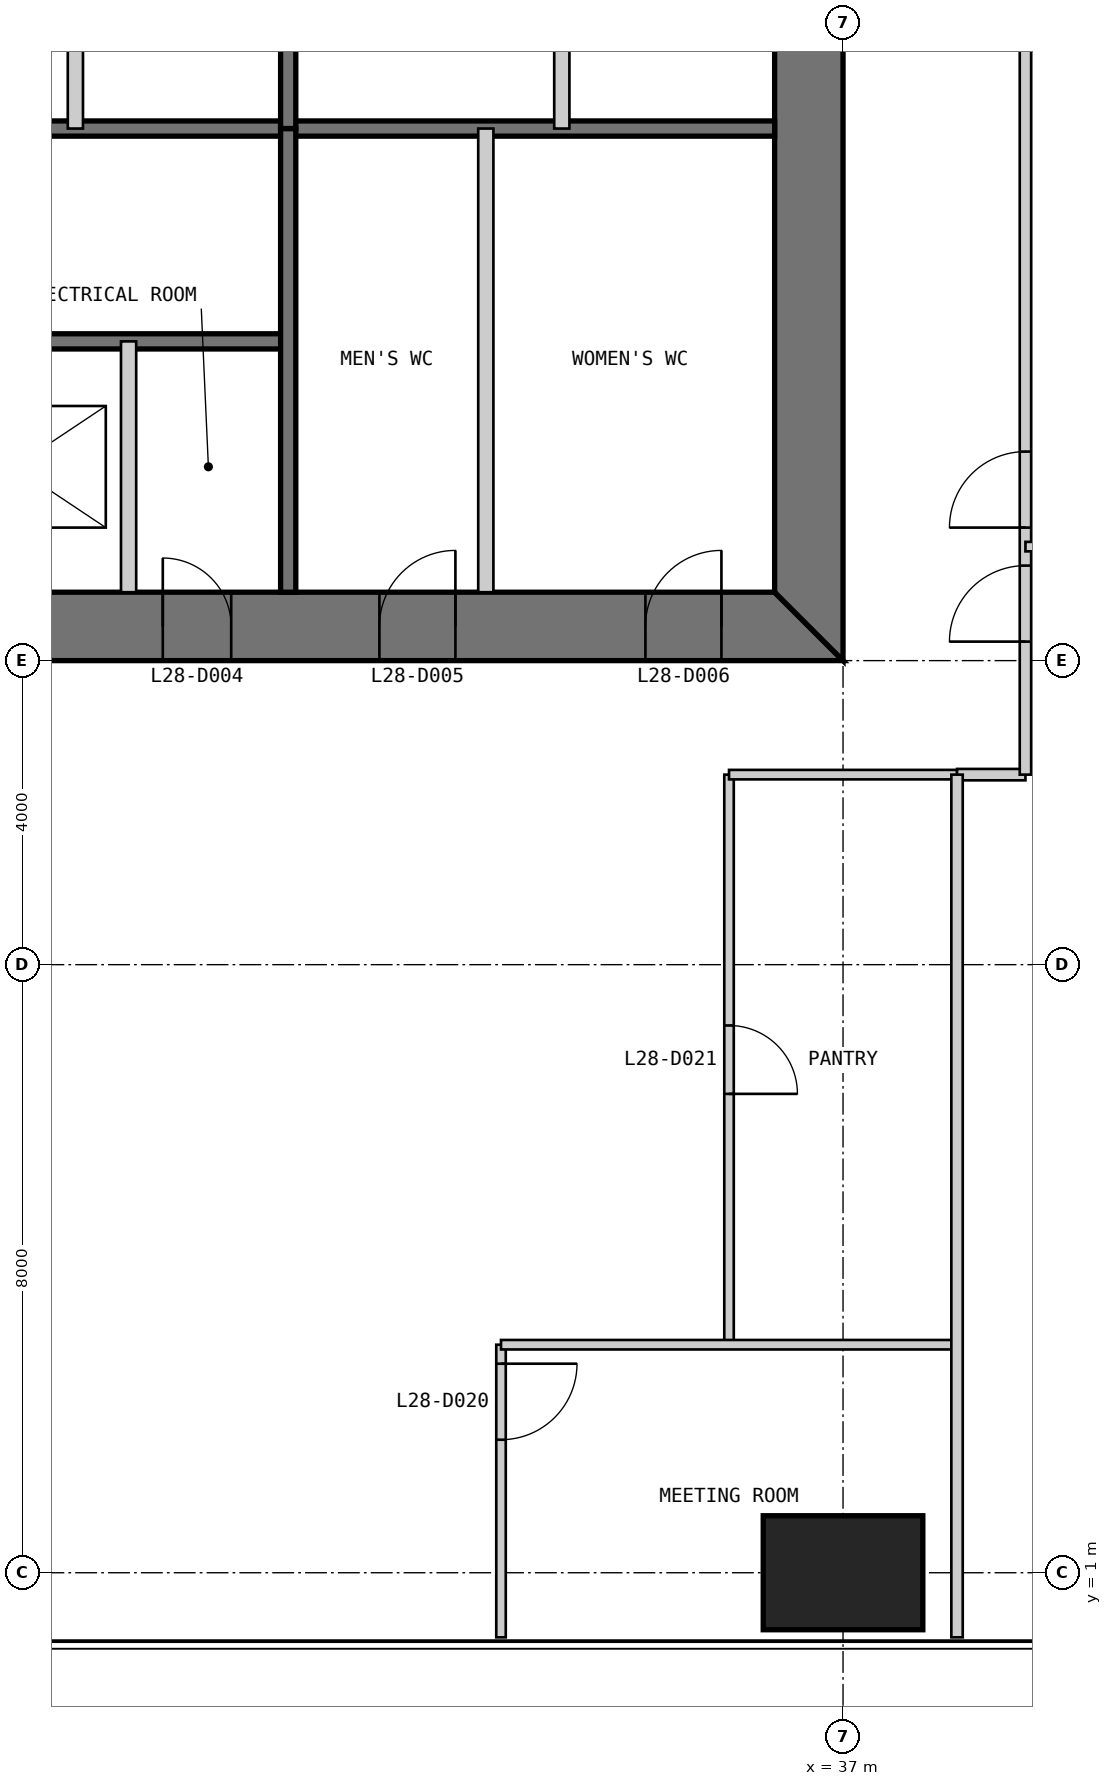
"""IFC4 building model, lengths in metres.
Left out: names, types, materials, properties, quantities, classifications, styles, units other than length and angle.
Written with IfcOpenShell. Run it as: python <this file> out.ifc"""

import sys

from ifc_helpers import new_model, si_unit, direction, frame, frame_2d, origin, origin_2d, place, context, subcontext, project, spatial, polyline, rectangle, outline, extrude, element, fill, save


model = new_model("IFC4")
c1 = context("Model", 3, precision=1e-05, world=origin(), true_north=direction((0.0, 1.0)))
c2 = subcontext(c1, "Body", "Model", "MODEL_VIEW")
j1 = project(units=[si_unit("LENGTHUNIT", "METRE"), si_unit("PLANEANGLEUNIT", "RADIAN")], contexts=[c1])
p1 = place(None, origin())
s1 = spatial("IfcSite", under=j1, at=p1, CompositionType="ELEMENT")
p2 = place(p1, origin())
s2 = spatial("IfcBuilding", under=s1, at=p2, CompositionType="ELEMENT")
p3 = place(p2, frame((0.0, 0.0, 122.4)))
s3 = spatial("IfcBuildingStorey", under=s2, at=p3, CompositionType="ELEMENT", Elevation=122.4)
p4 = place(p3, frame((37.0, 1.0, 0.0), z_axis=(0.0, 0.0, 1.0), x_axis=(1.0, 0.0, 0.0)))
e1 = element("IfcColumn", 1, at=p4, inside=s3, PredefinedType="COLUMN", context=c2, shape_type="SweptSolid", body=[
    extrude(rectangle(XDim=2.1, YDim=1.5, at=origin_2d()), origin(), (0.0, 0.0, 1.0), 4.0),
])
p5 = place(p3, frame((13.0, 13.45, 0.0), z_axis=(0.0, 0.0, 1.0), x_axis=(1.0, 0.0, 0.0)))
e2 = element("IfcWall", 2, at=p5, inside=s3, PredefinedType="SHEAR", context=c2, shape_type="SweptSolid", body=[
    extrude(outline(polyline([(0.0, -0.45), (24.0, -0.45), (23.1, 0.45), (0.9, 0.45), (0.0, -0.45)])), origin(), (0.0, 0.0, 1.0), 4.0),
])
p6 = place(p5, frame((4.9, 0.0, 0.0)))
e3 = element("IfcOpeningElement", 3, at=p6, cuts=e2, PredefinedType="OPENING", context=c2, shape_type="SweptSolid", body=[
    extrude(rectangle(XDim=1.0, YDim=2.2, at=frame_2d((0.5, 1.1))), frame((0.0, 0.46, 0.0), z_axis=(0.0, -1.0, 0.0), x_axis=(1.0, 0.0, 0.0)), (0.0, 0.0, 1.0), 0.92),
])
p7 = place(p5, frame((8.9, 0.0, 0.0)))
e4 = element("IfcOpeningElement", 4, at=p7, cuts=e2, PredefinedType="OPENING", context=c2, shape_type="SweptSolid", body=[
    extrude(rectangle(XDim=1.1, YDim=2.2, at=frame_2d((0.55, 1.1))), frame((0.0, 0.46, 0.0), z_axis=(0.0, -1.0, 0.0), x_axis=(1.0, 0.0, 0.0)), (0.0, 0.0, 1.0), 0.92),
])
p8 = place(p5, frame((15.05, 0.0, 0.0)))
e5 = element("IfcOpeningElement", 5, at=p8, cuts=e2, PredefinedType="OPENING", context=c2, shape_type="SweptSolid", body=[
    extrude(rectangle(XDim=0.9, YDim=2.2, at=frame_2d((0.45, 1.1))), frame((0.0, 0.46, 0.0), z_axis=(0.0, -1.0, 0.0), x_axis=(1.0, 0.0, 0.0)), (0.0, 0.0, 1.0), 0.92),
])
p9 = place(p5, frame((17.9, 0.0, 0.0)))
e6 = element("IfcOpeningElement", 6, at=p9, cuts=e2, PredefinedType="OPENING", context=c2, shape_type="SweptSolid", body=[
    extrude(rectangle(XDim=1.0, YDim=2.2, at=frame_2d((0.5, 1.1))), frame((0.0, 0.46, 0.0), z_axis=(0.0, -1.0, 0.0), x_axis=(1.0, 0.0, 0.0)), (0.0, 0.0, 1.0), 0.92),
])
p10 = place(p5, frame((21.4, 0.0, 0.0)))
e7 = element("IfcOpeningElement", 7, at=p10, cuts=e2, PredefinedType="OPENING", context=c2, shape_type="SweptSolid", body=[
    extrude(rectangle(XDim=1.0, YDim=2.2, at=frame_2d((0.5, 1.1))), frame((0.0, 0.46, 0.0), z_axis=(0.0, -1.0, 0.0), x_axis=(1.0, 0.0, 0.0)), (0.0, 0.0, 1.0), 0.92),
])
p11 = place(p3, frame((36.55, 13.9, 0.0), z_axis=(0.0, 0.0, 1.0), x_axis=(0.0, 1.0, 0.0)))
e8 = element("IfcWall", 8, at=p11, inside=s3, PredefinedType="SHEAR", context=c2, shape_type="SweptSolid", body=[
    extrude(outline(polyline([(-0.9, -0.45), (23.1, -0.45), (22.2, 0.45), (0.0, 0.45), (-0.9, -0.45)])), origin(), (0.0, 0.0, 1.0), 4.0),
])
p12 = place(p11, frame((20.2, 0.0, 0.0)))
e9 = element("IfcOpeningElement", 9, at=p12, cuts=e8, PredefinedType="OPENING", context=c2, shape_type="SweptSolid", body=[
    extrude(rectangle(XDim=1.0, YDim=2.2, at=frame_2d((0.5, 1.1))), frame((0.0, 0.46, 0.0), z_axis=(0.0, -1.0, 0.0), x_axis=(1.0, 0.0, 0.0)), (0.0, 0.0, 1.0), 0.92),
])
p13 = place(p11, frame((17.25, 0.0, 0.0)))
e10 = element("IfcOpeningElement", 10, at=p13, cuts=e8, PredefinedType="OPENING", context=c2, shape_type="SweptSolid", body=[
    extrude(rectangle(XDim=0.9, YDim=2.2, at=frame_2d((0.45, 1.1))), frame((0.0, 0.46, 0.0), z_axis=(0.0, -1.0, 0.0), x_axis=(1.0, 0.0, 0.0)), (0.0, 0.0, 1.0), 0.92),
])
p14 = place(p3, frame((20.3, 17.2, 0.0), z_axis=(0.0, 0.0, 1.0), x_axis=(1.0, 0.0, 0.0)))
e11 = element("IfcWall", 11, at=p14, inside=s3, PredefinedType="SOLIDWALL", context=c2, shape_type="SweptSolid", body=[
    extrude(rectangle(XDim=9.4, YDim=0.2, at=frame_2d((4.7, 0.0))), origin(), (0.0, 0.0, 1.0), 3.8),
])
p15 = place(p14, frame((0.25, 0.0, 0.0)))
e12 = element("IfcOpeningElement", 12, at=p15, cuts=e11, PredefinedType="OPENING", context=c2, shape_type="SweptSolid", body=[
    extrude(rectangle(XDim=1.0, YDim=2.2, at=frame_2d((0.5, 1.1))), frame((0.0, 0.11, 0.0), z_axis=(0.0, -1.0, 0.0), x_axis=(1.0, 0.0, 0.0)), (0.0, 0.0, 1.0), 0.22),
])
p16 = place(p3, frame((20.3, 20.0, 0.0), z_axis=(0.0, 0.0, 1.0), x_axis=(1.0, 0.0, 0.0)))
e13 = element("IfcWall", 13, at=p16, inside=s3, PredefinedType="SOLIDWALL", context=c2, shape_type="SweptSolid", body=[
    extrude(rectangle(XDim=15.8, YDim=0.2, at=frame_2d((7.9, 0.0))), origin(), (0.0, 0.0, 1.0), 3.8),
])
p17 = place(p3, frame((27.6, 13.9, 0.0), z_axis=(0.0, 0.0, 1.0), x_axis=(0.0, 1.0, 0.0)))
e14 = element("IfcWall", 14, at=p17, inside=s3, PredefinedType="PARTITIONING", context=c2, shape_type="SweptSolid", body=[
    extrude(rectangle(XDim=3.3, YDim=0.2, at=frame_2d((1.65, 0.0))), origin(), (0.0, 0.0, 1.0), 3.8),
])
p18 = place(p3, frame((29.7, 13.9, 0.0), z_axis=(0.0, 0.0, 1.0), x_axis=(0.0, 1.0, 0.0)))
e15 = element("IfcWall", 15, at=p18, inside=s3, PredefinedType="SOLIDWALL", context=c2, shape_type="SweptSolid", body=[
    extrude(rectangle(XDim=6.1, YDim=0.2, at=frame_2d((3.05, 0.0))), origin(), (0.0, 0.0, 1.0), 3.8),
])
p19 = place(p3, frame((32.3, 13.9, 0.0), z_axis=(0.0, 0.0, 1.0), x_axis=(0.0, 1.0, 0.0)))
e16 = element("IfcWall", 16, at=p19, inside=s3, PredefinedType="PARTITIONING", context=c2, shape_type="SweptSolid", body=[
    extrude(rectangle(XDim=6.1, YDim=0.2, at=frame_2d((3.05, 0.0))), origin(), (0.0, 0.0, 1.0), 3.8),
])
p20 = place(p3, frame((33.3, 36.1, 0.0), z_axis=(0.0, 0.0, 1.0), x_axis=(0.0, -1.0, 0.0)))
e17 = element("IfcWall", 17, at=p20, inside=s3, PredefinedType="PARTITIONING", context=c2, shape_type="SweptSolid", body=[
    extrude(rectangle(XDim=16.1, YDim=0.2, at=frame_2d((8.05, 0.0))), origin(), (0.0, 0.0, 1.0), 3.8),
])
p21 = place(p3, frame((29.7, 36.1, 0.0), z_axis=(0.0, 0.0, 1.0), x_axis=(0.0, -1.0, 0.0)))
e18 = element("IfcWall", 18, at=p21, inside=s3, PredefinedType="SOLIDWALL", context=c2, shape_type="SweptSolid", body=[
    extrude(rectangle(XDim=16.1, YDim=0.2, at=frame_2d((8.05, 0.0))), origin(), (0.0, 0.0, 1.0), 3.8),
])
p22 = place(p3, frame((26.9, 30.0, 0.0), z_axis=(0.0, 0.0, 1.0), x_axis=(0.0, -1.0, 0.0)))
e19 = element("IfcWall", 19, at=p22, inside=s3, PredefinedType="PARTITIONING", context=c2, shape_type="SweptSolid", body=[
    extrude(rectangle(XDim=10.0, YDim=0.2, at=frame_2d((5.0, 0.0))), origin(), (0.0, 0.0, 1.0), 3.8),
])
p23 = place(p3, frame((32.5, 0.15, 0.0), z_axis=(0.0, 0.0, 1.0), x_axis=(0.0, 1.0, 0.0)))
e20 = element("IfcWall", 20, at=p23, inside=s3, PredefinedType="PARTITIONING", context=c2, shape_type="SweptSolid", body=[
    extrude(rectangle(XDim=3.85, YDim=0.125, at=frame_2d((1.925, 0.0))), origin(), (0.0, 0.0, 1.0), 3.85),
])
p24 = place(p23, frame((2.6, 0.0, 0.0)))
e21 = element("IfcOpeningElement", 21, at=p24, cuts=e20, PredefinedType="OPENING", context=c2, shape_type="SweptSolid", body=[
    extrude(rectangle(XDim=1.0, YDim=2.2, at=frame_2d((0.5, 1.1))), frame((0.0, 0.073, 0.0), z_axis=(0.0, -1.0, 0.0), x_axis=(1.0, 0.0, 0.0)), (0.0, 0.0, 1.0), 0.145),
])
p25 = place(p3, frame((35.5, 4.0, 0.0), z_axis=(0.0, 0.0, 1.0), x_axis=(0.0, 1.0, 0.0)))
e22 = element("IfcWall", 22, at=p25, inside=s3, PredefinedType="PARTITIONING", context=c2, shape_type="SweptSolid", body=[
    extrude(rectangle(XDim=7.5, YDim=0.125, at=frame_2d((3.75, 0.0))), origin(), (0.0, 0.0, 1.0), 3.85),
])
p26 = place(p25, frame((3.3, 0.0, 0.0)))
e23 = element("IfcOpeningElement", 23, at=p26, cuts=e22, PredefinedType="OPENING", context=c2, shape_type="SweptSolid", body=[
    extrude(rectangle(XDim=0.9, YDim=2.2, at=frame_2d((0.45, 1.1))), frame((0.0, 0.073, 0.0), z_axis=(0.0, -1.0, 0.0), x_axis=(1.0, 0.0, 0.0)), (0.0, 0.0, 1.0), 0.145),
])
p27 = place(p3, frame((32.5, 4.0, 0.0), z_axis=(0.0, 0.0, 1.0), x_axis=(1.0, 0.0, 0.0)))
e24 = element("IfcWall", 24, at=p27, inside=s3, PredefinedType="PARTITIONING", context=c2, shape_type="SweptSolid", body=[
    extrude(rectangle(XDim=6.0, YDim=0.125, at=frame_2d((3.0, 0.0))), origin(), (0.0, 0.0, 1.0), 3.85),
])
p28 = place(p3, frame((35.5, 11.5, 0.0), z_axis=(0.0, 0.0, 1.0), x_axis=(1.0, 0.0, 0.0)))
e25 = element("IfcWall", 25, at=p28, inside=s3, PredefinedType="PARTITIONING", context=c2, shape_type="SweptSolid", body=[
    extrude(rectangle(XDim=3.0, YDim=0.125, at=frame_2d((1.5, 0.0))), origin(), (0.0, 0.0, 1.0), 3.85),
])
p29 = place(p3, frame((38.5, 11.5, 0.0), z_axis=(0.0, 0.0, 1.0), x_axis=(1.0, 0.0, 0.0)))
e26 = element("IfcWall", 26, at=p29, inside=s3, PredefinedType="PARTITIONING", context=c2, shape_type="SweptSolid", body=[
    extrude(rectangle(XDim=0.9, YDim=0.15, at=frame_2d((0.45, 0.0))), origin(), (0.0, 0.0, 1.0), 3.85),
])
p30 = place(p3, frame((39.4, 11.5, 0.0), z_axis=(0.0, 0.0, 1.0), x_axis=(0.0, 1.0, 0.0)))
e27 = element("IfcWall", 27, at=p30, inside=s3, PredefinedType="PARTITIONING", context=c2, shape_type="SweptSolid", body=[
    extrude(rectangle(XDim=27.0, YDim=0.15, at=frame_2d((13.5, 0.0))), origin(), (0.0, 0.0, 1.0), 3.85),
])
p31 = place(p30, frame((3.25, 0.0, 0.0)))
e28 = element("IfcOpeningElement", 28, at=p31, cuts=e27, PredefinedType="OPENING", context=c2, shape_type="SweptSolid", body=[
    extrude(rectangle(XDim=1.0, YDim=2.2, at=frame_2d((0.5, 1.1))), frame((0.0, 0.085, 0.0), z_axis=(0.0, -1.0, 0.0), x_axis=(1.0, 0.0, 0.0)), (0.0, 0.0, 1.0), 0.17),
])
p32 = place(p30, frame((25.75, 0.0, 0.0)))
e29 = element("IfcOpeningElement", 29, at=p32, cuts=e27, PredefinedType="OPENING", context=c2, shape_type="SweptSolid", body=[
    extrude(rectangle(XDim=1.0, YDim=2.2, at=frame_2d((0.5, 1.1))), frame((0.0, 0.085, 0.0), z_axis=(0.0, -1.0, 0.0), x_axis=(1.0, 0.0, 0.0)), (0.0, 0.0, 1.0), 0.17),
])
p33 = place(p30, frame((1.75, 0.0, 0.0)))
e30 = element("IfcOpeningElement", 30, at=p33, cuts=e27, PredefinedType="OPENING", context=c2, shape_type="SweptSolid", body=[
    extrude(rectangle(XDim=1.0, YDim=2.2, at=frame_2d((0.5, 1.1))), frame((0.0, 0.085, 0.0), z_axis=(0.0, -1.0, 0.0), x_axis=(1.0, 0.0, 0.0)), (0.0, 0.0, 1.0), 0.17),
])
p34 = place(p3, frame((38.5, 0.15, 0.0), z_axis=(0.0, 0.0, 1.0), x_axis=(0.0, 1.0, 0.0)))
e31 = element("IfcWall", 31, at=p34, inside=s3, PredefinedType="PARTITIONING", context=c2, shape_type="SweptSolid", body=[
    extrude(rectangle(XDim=11.35, YDim=0.15, at=frame_2d((5.675, 0.0))), origin(), (0.0, 0.0, 1.0), 3.85),
])
p35 = place(p3, frame((46.0, 14.5, 0.0), z_axis=(0.0, 0.0, 1.0), x_axis=(-1.0, 0.0, 0.0)))
e32 = element("IfcWall", 32, at=p35, inside=s3, PredefinedType="PARTITIONING", context=c2, shape_type="SweptSolid", body=[
    extrude(rectangle(XDim=6.6, YDim=0.125, at=frame_2d((3.3, 0.0))), origin(), (0.0, 0.0, 1.0), 3.85),
])
p36 = place(p8, origin())
e33 = element("IfcDoor", 33, at=p36, inside=s3, OperationType="SINGLE_SWING_LEFT", PredefinedType="DOOR", context=c2, shape_type="SweptSolid", body=[
    extrude(rectangle(XDim=0.9, YDim=2.2, at=frame_2d((0.45, 1.1))), frame((0.0, 0.025, 0.0), z_axis=(0.0, -1.0, 0.0), x_axis=(1.0, 0.0, 0.0)), (0.0, 0.0, 1.0), 0.05),
    extrude(outline(polyline([(0.0, 0.0), (0.04, 0.0), (0.04, 2.16), (0.86, 2.16), (0.86, 0.0), (0.9, 0.0), (0.9, 2.2), (0.0, 2.2), (0.0, 0.0)])), frame((0.0, 0.3, 0.0), z_axis=(0.0, -1.0, 0.0), x_axis=(1.0, 0.0, 0.0)), (0.0, 0.0, 1.0), 0.6),
])
fill(e5, e33)
p37 = place(p9, origin())
e34 = element("IfcDoor", 34, at=p37, inside=s3, OperationType="SINGLE_SWING_RIGHT", PredefinedType="DOOR", context=c2, shape_type="SweptSolid", body=[
    extrude(rectangle(XDim=1.0, YDim=2.2, at=frame_2d((0.5, 1.1))), frame((0.0, 0.025, 0.0), z_axis=(0.0, -1.0, 0.0), x_axis=(1.0, 0.0, 0.0)), (0.0, 0.0, 1.0), 0.05),
    extrude(outline(polyline([(0.0, 0.0), (0.04, 0.0), (0.04, 2.16), (0.96, 2.16), (0.96, 0.0), (1.0, 0.0), (1.0, 2.2), (0.0, 2.2), (0.0, 0.0)])), frame((0.0, 0.3, 0.0), z_axis=(0.0, -1.0, 0.0), x_axis=(1.0, 0.0, 0.0)), (0.0, 0.0, 1.0), 0.6),
])
fill(e6, e34)
p38 = place(p10, origin())
e35 = element("IfcDoor", 35, at=p38, inside=s3, OperationType="SINGLE_SWING_RIGHT", PredefinedType="DOOR", context=c2, shape_type="SweptSolid", body=[
    extrude(rectangle(XDim=1.0, YDim=2.2, at=frame_2d((0.5, 1.1))), frame((0.0, 0.025, 0.0), z_axis=(0.0, -1.0, 0.0), x_axis=(1.0, 0.0, 0.0)), (0.0, 0.0, 1.0), 0.05),
    extrude(outline(polyline([(0.0, 0.0), (0.04, 0.0), (0.04, 2.16), (0.96, 2.16), (0.96, 0.0), (1.0, 0.0), (1.0, 2.2), (0.0, 2.2), (0.0, 0.0)])), frame((0.0, 0.3, 0.0), z_axis=(0.0, -1.0, 0.0), x_axis=(1.0, 0.0, 0.0)), (0.0, 0.0, 1.0), 0.6),
])
fill(e7, e35)
p39 = place(p24, frame((1.0, 0.0, 0.0), z_axis=(0.0, 0.0, 1.0), x_axis=(-1.0, 0.0, 0.0)))
e36 = element("IfcDoor", 36, at=p39, inside=s3, OperationType="SINGLE_SWING_LEFT", PredefinedType="DOOR", context=c2, shape_type="SweptSolid", body=[
    extrude(rectangle(XDim=1.0, YDim=2.2, at=frame_2d((0.5, 1.1))), frame((0.0, 0.025, 0.0), z_axis=(0.0, -1.0, 0.0), x_axis=(1.0, 0.0, 0.0)), (0.0, 0.0, 1.0), 0.05),
])
fill(e21, e36)
p40 = place(p26, frame((0.9, 0.0, 0.0), z_axis=(0.0, 0.0, 1.0), x_axis=(-1.0, 0.0, 0.0)))
e37 = element("IfcDoor", 37, at=p40, inside=s3, OperationType="SINGLE_SWING_RIGHT", PredefinedType="DOOR", context=c2, shape_type="SweptSolid", body=[
    extrude(rectangle(XDim=0.9, YDim=2.2, at=frame_2d((0.45, 1.1))), frame((0.0, 0.025, 0.0), z_axis=(0.0, -1.0, 0.0), x_axis=(1.0, 0.0, 0.0)), (0.0, 0.0, 1.0), 0.05),
])
fill(e23, e37)
p41 = place(p31, origin())
e38 = element("IfcDoor", 38, at=p41, inside=s3, OperationType="SINGLE_SWING_LEFT", PredefinedType="DOOR", context=c2, shape_type="SweptSolid", body=[
    extrude(rectangle(XDim=1.0, YDim=2.2, at=frame_2d((0.5, 1.1))), frame((0.0, 0.025, 0.0), z_axis=(0.0, -1.0, 0.0), x_axis=(1.0, 0.0, 0.0)), (0.0, 0.0, 1.0), 0.05),
])
fill(e28, e38)
p42 = place(p33, origin())
e39 = element("IfcDoor", 39, at=p42, inside=s3, OperationType="SINGLE_SWING_LEFT", PredefinedType="DOOR", context=c2, shape_type="SweptSolid", body=[
    extrude(rectangle(XDim=1.0, YDim=2.2, at=frame_2d((0.5, 1.1))), frame((0.0, 0.025, 0.0), z_axis=(0.0, -1.0, 0.0), x_axis=(1.0, 0.0, 0.0)), (0.0, 0.0, 1.0), 0.05),
])
fill(e30, e39)
save(model, sys.argv[1])
